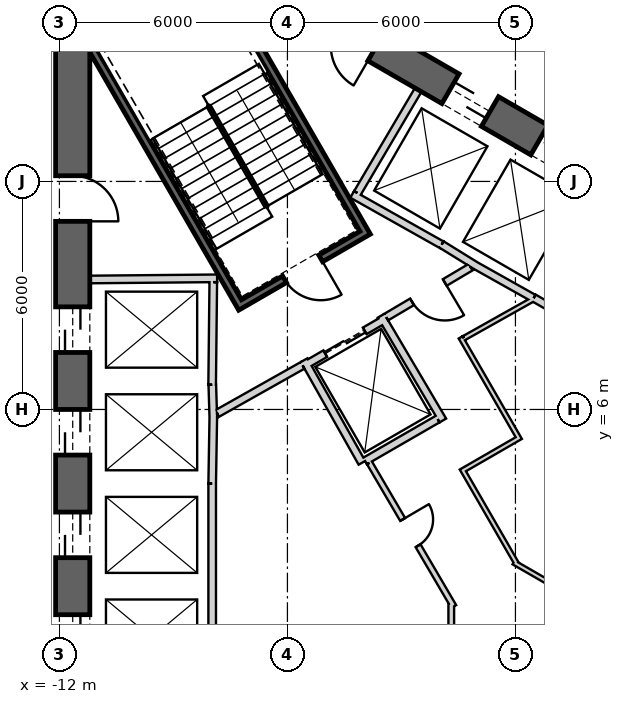
"""IFC4 building model, lengths in metres.
Left out: names, types, materials, properties, quantities, classifications, styles, units other than length and angle.
Written with IfcOpenShell. Run it as: python <this file> out.ifc"""

import sys

from ifc_helpers import new_model, si_unit, direction, frame, frame_2d, origin, place, context, subcontext, project, spatial, rectangle, extrude, element, fill, save


model = new_model("IFC4")
c1 = context("Model", 3, precision=1e-05, world=origin(), true_north=direction((0.0, 1.0)))
c2 = subcontext(c1, "Body", "Model", "MODEL_VIEW")
j1 = project(units=[si_unit("LENGTHUNIT", "METRE"), si_unit("PLANEANGLEUNIT", "RADIAN")], contexts=[c1])
p1 = place(None, origin())
s1 = spatial("IfcSite", under=j1, at=p1, CompositionType="ELEMENT")
p2 = place(p1, origin())
s2 = spatial("IfcBuilding", under=s1, at=p2, CompositionType="ELEMENT")
p3 = place(p2, frame((0.0, 0.0, 131.6)))
s3 = spatial("IfcBuildingStorey", under=s2, at=p3, CompositionType="ELEMENT", Elevation=131.6)
p4 = place(p3, frame((19.475, 2.208, 0.0), z_axis=(0.0, 0.0, 1.0), x_axis=(-0.866028369851, 0.499994862586, 0.0)))
e1 = element("IfcWall", 1, at=p4, inside=s3, PredefinedType="SHEAR", context=c2, shape_type="SweptSolid", body=[
    extrude(rectangle(XDim=31.523, YDim=0.9, at=frame_2d((15.762, 0.0))), origin(), (0.0, 0.0, 1.0), 4.1),
])
p5 = place(p4, frame((7.062, 0.0, 0.0)))
e2 = element("IfcOpeningElement", 2, at=p5, cuts=e1, PredefinedType="OPENING", context=c2, shape_type="SweptSolid", body=[
    extrude(rectangle(XDim=1.2, YDim=2.4, at=frame_2d((0.6, 1.2))), frame((0.0, 0.46, 0.0), z_axis=(0.0, -1.0, 0.0), x_axis=(1.0, 0.0, 0.0)), (0.0, 0.0, 1.0), 0.92),
])
p6 = place(p4, frame((9.762, 0.0, 0.0)))
e3 = element("IfcOpeningElement", 3, at=p6, cuts=e1, PredefinedType="OPENING", context=c2, shape_type="SweptSolid", body=[
    extrude(rectangle(XDim=1.2, YDim=2.4, at=frame_2d((0.6, 1.2))), frame((0.0, 0.46, 0.0), z_axis=(0.0, -1.0, 0.0), x_axis=(1.0, 0.0, 0.0)), (0.0, 0.0, 1.0), 0.92),
])
p7 = place(p4, frame((12.462, 0.0, 0.0)))
e4 = element("IfcOpeningElement", 4, at=p7, cuts=e1, PredefinedType="OPENING", context=c2, shape_type="SweptSolid", body=[
    extrude(rectangle(XDim=1.2, YDim=2.4, at=frame_2d((0.6, 1.2))), frame((0.0, 0.46, 0.0), z_axis=(0.0, -1.0, 0.0), x_axis=(1.0, 0.0, 0.0)), (0.0, 0.0, 1.0), 0.92),
])
p8 = place(p4, frame((15.162, 0.0, 0.0)))
e5 = element("IfcOpeningElement", 5, at=p8, cuts=e1, PredefinedType="OPENING", context=c2, shape_type="SweptSolid", body=[
    extrude(rectangle(XDim=1.2, YDim=2.4, at=frame_2d((0.6, 1.2))), frame((0.0, 0.46, 0.0), z_axis=(0.0, -1.0, 0.0), x_axis=(1.0, 0.0, 0.0)), (0.0, 0.0, 1.0), 0.92),
])
p9 = place(p4, frame((17.862, 0.0, 0.0)))
e6 = element("IfcOpeningElement", 6, at=p9, cuts=e1, PredefinedType="OPENING", context=c2, shape_type="SweptSolid", body=[
    extrude(rectangle(XDim=1.2, YDim=2.4, at=frame_2d((0.6, 1.2))), frame((0.0, 0.46, 0.0), z_axis=(0.0, -1.0, 0.0), x_axis=(1.0, 0.0, 0.0)), (0.0, 0.0, 1.0), 0.92),
])
p10 = place(p4, frame((20.562, 0.0, 0.0)))
e7 = element("IfcOpeningElement", 7, at=p10, cuts=e1, PredefinedType="OPENING", context=c2, shape_type="SweptSolid", body=[
    extrude(rectangle(XDim=1.2, YDim=2.4, at=frame_2d((0.6, 1.2))), frame((0.0, 0.46, 0.0), z_axis=(0.0, -1.0, 0.0), x_axis=(1.0, 0.0, 0.0)), (0.0, 0.0, 1.0), 0.92),
])
p11 = place(p4, frame((23.262, 0.0, 0.0)))
e8 = element("IfcOpeningElement", 8, at=p11, cuts=e1, PredefinedType="OPENING", context=c2, shape_type="SweptSolid", body=[
    extrude(rectangle(XDim=1.2, YDim=2.4, at=frame_2d((0.6, 1.2))), frame((0.0, 0.46, 0.0), z_axis=(0.0, -1.0, 0.0), x_axis=(1.0, 0.0, 0.0)), (0.0, 0.0, 1.0), 0.92),
])
p12 = place(p4, frame((3.612, 0.0, 0.0)))
e9 = element("IfcOpeningElement", 9, at=p12, cuts=e1, PredefinedType="OPENING", context=c2, shape_type="SweptSolid", body=[
    extrude(rectangle(XDim=1.2, YDim=2.4, at=frame_2d((0.6, 1.2))), frame((0.0, 0.46, 0.0), z_axis=(0.0, -1.0, 0.0), x_axis=(1.0, 0.0, 0.0)), (0.0, 0.0, 1.0), 0.92),
])
p13 = place(p4, frame((26.712, 0.0, 0.0)))
e10 = element("IfcOpeningElement", 10, at=p13, cuts=e1, PredefinedType="OPENING", context=c2, shape_type="SweptSolid", body=[
    extrude(rectangle(XDim=1.2, YDim=2.4, at=frame_2d((0.6, 1.2))), frame((0.0, 0.46, 0.0), z_axis=(0.0, -1.0, 0.0), x_axis=(1.0, 0.0, 0.0)), (0.0, 0.0, 1.0), 0.92),
])
p14 = place(p3, frame((-11.65, 15.762, 0.0), z_axis=(0.0, 0.0, 1.0), x_axis=(0.0, -1.0, 0.0)))
e11 = element("IfcWall", 11, at=p14, inside=s3, PredefinedType="SHEAR", context=c2, shape_type="SweptSolid", body=[
    extrude(rectangle(XDim=31.523, YDim=0.9, at=frame_2d((15.762, 0.0))), origin(), (0.0, 0.0, 1.0), 4.1),
])
p15 = place(p14, frame((7.062, 0.0, 0.0)))
e12 = element("IfcOpeningElement", 12, at=p15, cuts=e11, PredefinedType="OPENING", context=c2, shape_type="SweptSolid", body=[
    extrude(rectangle(XDim=1.2, YDim=2.4, at=frame_2d((0.6, 1.2))), frame((0.0, 0.46, 0.0), z_axis=(0.0, -1.0, 0.0), x_axis=(1.0, 0.0, 0.0)), (0.0, 0.0, 1.0), 0.92),
])
p16 = place(p14, frame((9.762, 0.0, 0.0)))
e13 = element("IfcOpeningElement", 13, at=p16, cuts=e11, PredefinedType="OPENING", context=c2, shape_type="SweptSolid", body=[
    extrude(rectangle(XDim=1.2, YDim=2.4, at=frame_2d((0.6, 1.2))), frame((0.0, 0.46, 0.0), z_axis=(0.0, -1.0, 0.0), x_axis=(1.0, 0.0, 0.0)), (0.0, 0.0, 1.0), 0.92),
])
p17 = place(p14, frame((12.462, 0.0, 0.0)))
e14 = element("IfcOpeningElement", 14, at=p17, cuts=e11, PredefinedType="OPENING", context=c2, shape_type="SweptSolid", body=[
    extrude(rectangle(XDim=1.2, YDim=2.4, at=frame_2d((0.6, 1.2))), frame((0.0, 0.46, 0.0), z_axis=(0.0, -1.0, 0.0), x_axis=(1.0, 0.0, 0.0)), (0.0, 0.0, 1.0), 0.92),
])
p18 = place(p14, frame((15.162, 0.0, 0.0)))
e15 = element("IfcOpeningElement", 15, at=p18, cuts=e11, PredefinedType="OPENING", context=c2, shape_type="SweptSolid", body=[
    extrude(rectangle(XDim=1.2, YDim=2.4, at=frame_2d((0.6, 1.2))), frame((0.0, 0.46, 0.0), z_axis=(0.0, -1.0, 0.0), x_axis=(1.0, 0.0, 0.0)), (0.0, 0.0, 1.0), 0.92),
])
p19 = place(p14, frame((17.862, 0.0, 0.0)))
e16 = element("IfcOpeningElement", 16, at=p19, cuts=e11, PredefinedType="OPENING", context=c2, shape_type="SweptSolid", body=[
    extrude(rectangle(XDim=1.2, YDim=2.4, at=frame_2d((0.6, 1.2))), frame((0.0, 0.46, 0.0), z_axis=(0.0, -1.0, 0.0), x_axis=(1.0, 0.0, 0.0)), (0.0, 0.0, 1.0), 0.92),
])
p20 = place(p14, frame((20.562, 0.0, 0.0)))
e17 = element("IfcOpeningElement", 17, at=p20, cuts=e11, PredefinedType="OPENING", context=c2, shape_type="SweptSolid", body=[
    extrude(rectangle(XDim=1.2, YDim=2.4, at=frame_2d((0.6, 1.2))), frame((0.0, 0.46, 0.0), z_axis=(0.0, -1.0, 0.0), x_axis=(1.0, 0.0, 0.0)), (0.0, 0.0, 1.0), 0.92),
])
p21 = place(p14, frame((23.262, 0.0, 0.0)))
e18 = element("IfcOpeningElement", 18, at=p21, cuts=e11, PredefinedType="OPENING", context=c2, shape_type="SweptSolid", body=[
    extrude(rectangle(XDim=1.2, YDim=2.4, at=frame_2d((0.6, 1.2))), frame((0.0, 0.46, 0.0), z_axis=(0.0, -1.0, 0.0), x_axis=(1.0, 0.0, 0.0)), (0.0, 0.0, 1.0), 0.92),
])
p22 = place(p14, frame((3.612, 0.0, 0.0)))
e19 = element("IfcOpeningElement", 19, at=p22, cuts=e11, PredefinedType="OPENING", context=c2, shape_type="SweptSolid", body=[
    extrude(rectangle(XDim=1.2, YDim=2.4, at=frame_2d((0.6, 1.2))), frame((0.0, 0.46, 0.0), z_axis=(0.0, -1.0, 0.0), x_axis=(1.0, 0.0, 0.0)), (0.0, 0.0, 1.0), 0.92),
])
p23 = place(p14, frame((26.712, 0.0, 0.0)))
e20 = element("IfcOpeningElement", 20, at=p23, cuts=e11, PredefinedType="OPENING", context=c2, shape_type="SweptSolid", body=[
    extrude(rectangle(XDim=1.2, YDim=2.4, at=frame_2d((0.6, 1.2))), frame((0.0, 0.46, 0.0), z_axis=(0.0, -1.0, 0.0), x_axis=(1.0, 0.0, 0.0)), (0.0, 0.0, 1.0), 0.92),
])
p24 = place(p3, frame((-11.2, 9.42, 0.0), z_axis=(0.0, 0.0, 1.0), x_axis=(0.999957167047, 0.009255488683, 0.0)))
e21 = element("IfcWall", 21, at=p24, inside=s3, PredefinedType="PLUMBINGWALL", context=c2, shape_type="SweptSolid", body=[
    extrude(rectangle(XDim=3.35, YDim=0.2, at=frame_2d((1.675, 0.0))), origin(), (0.0, 0.0, 1.0), 3.8),
])
p25 = place(p3, frame((-7.951, 9.35, 0.0), z_axis=(0.0, 0.0, 1.0), x_axis=(-0.011120469654, -0.999938165666, 0.0)))
e22 = element("IfcWall", 22, at=p25, inside=s3, PredefinedType="PLUMBINGWALL", context=c2, shape_type="SweptSolid", body=[
    extrude(rectangle(XDim=2.7, YDim=0.2, at=frame_2d((1.35, 0.0))), origin(), (0.0, 0.0, 1.0), 3.8),
])
p26 = place(p3, frame((7.497, 4.886, 0.0), z_axis=(0.0, 0.0, 1.0), x_axis=(-0.866030989016, 0.499990325971, 0.0)))
e23 = element("IfcWall", 23, at=p26, inside=s3, PredefinedType="PLUMBINGWALL", context=c2, shape_type="SweptSolid", body=[
    extrude(rectangle(XDim=8.1, YDim=0.2, at=frame_2d((4.05, 0.0))), origin(), (0.0, 0.0, 1.0), 3.8),
])
p27 = place(p3, frame((-7.977, 6.65, 0.0), z_axis=(0.0, 0.0, 1.0), x_axis=(0.030861509705, -0.999523670164, 0.0)))
e24 = element("IfcWall", 24, at=p27, inside=s3, PredefinedType="PLUMBINGWALL", context=c2, shape_type="SweptSolid", body=[
    extrude(rectangle(XDim=0.878, YDim=0.2, at=frame_2d((0.439, 0.0))), origin(), (0.0, 0.0, 1.0), 3.8),
])
p28 = place(p3, frame((-7.949, 5.894, 0.0), z_axis=(0.0, 0.0, 1.0), x_axis=(-0.016809909365, -0.999858703491, 0.0)))
e25 = element("IfcWall", 25, at=p28, inside=s3, PredefinedType="PLUMBINGWALL", context=c2, shape_type="SweptSolid", body=[
    extrude(rectangle(XDim=1.844, YDim=0.2, at=frame_2d((0.922, 0.0))), origin(), (0.0, 0.0, 1.0), 3.8),
])
p29 = place(p3, frame((-7.98, 4.05, 0.0), z_axis=(0.0, 0.0, 1.0), x_axis=(0.0, -1.0, 0.0)))
e26 = element("IfcWall", 26, at=p29, inside=s3, PredefinedType="PLUMBINGWALL", context=c2, shape_type="SweptSolid", body=[
    extrude(rectangle(XDim=8.1, YDim=0.2, at=frame_2d((4.05, 0.0))), origin(), (0.0, 0.0, 1.0), 3.8),
])
p30 = place(p3, frame((-1.941, 10.339, 0.0), z_axis=(0.0, 0.0, 1.0), x_axis=(0.850216889117, -0.526432561171, 0.0)))
e27 = element("IfcWall", 27, at=p30, inside=s3, PredefinedType="PLUMBINGWALL", context=c2, shape_type="SweptSolid", body=[
    extrude(rectangle(XDim=1.078, YDim=0.2, at=frame_2d((0.539, 0.0))), origin(), (0.0, 0.0, 1.0), 3.8),
])
p31 = place(p3, frame((0.478, 8.928, 0.0), z_axis=(0.0, 0.0, 1.0), x_axis=(-0.871988740738, 0.489525929882, 0.0)))
e28 = element("IfcWall", 28, at=p31, inside=s3, PredefinedType="PLUMBINGWALL", context=c2, shape_type="SweptSolid", body=[
    extrude(rectangle(XDim=1.845, YDim=0.2, at=frame_2d((0.922, 0.0))), origin(), (0.0, 0.0, 1.0), 3.8),
])
p32 = place(p3, frame((-4.296, 11.659, 0.0), z_axis=(0.0, 0.0, 1.0), x_axis=(0.871534483978, -0.490334215854, 0.0)))
e29 = element("IfcWall", 29, at=p32, inside=s3, PredefinedType="PLUMBINGWALL", context=c2, shape_type="SweptSolid", body=[
    extrude(rectangle(XDim=2.7, YDim=0.2, at=frame_2d((1.35, 0.0))), origin(), (0.0, 0.0, 1.0), 3.8),
])
p33 = place(p3, frame((-4.158, 11.696, 0.0), z_axis=(0.0, 0.0, 1.0), x_axis=(0.508018930956, 0.861345903683, 0.0)))
e30 = element("IfcWall", 30, at=p33, inside=s3, PredefinedType="PLUMBINGWALL", context=c2, shape_type="SweptSolid", body=[
    extrude(rectangle(XDim=3.15, YDim=0.2, at=frame_2d((1.575, 0.0))), origin(), (0.0, 0.0, 1.0), 3.8),
])
p34 = place(p3, frame((-11.245, 15.678, -0.3), z_axis=(0.0, 0.0, 1.0), x_axis=(0.499977274689, -0.866038523851, 0.0)))
e31 = element("IfcWall", 31, at=p34, inside=s3, PredefinedType="SHEAR", context=c2, shape_type="SweptSolid", body=[
    extrude(rectangle(XDim=8.1, YDim=0.2, at=frame_2d((4.05, 0.0))), origin(), (0.0, 0.0, 1.0), 4.1),
])
p35 = place(p3, frame((-7.854, 17.405, -0.3), z_axis=(0.0, 0.0, 1.0), x_axis=(0.499997992926, -0.866026562566, 0.0)))
e32 = element("IfcWall", 32, at=p35, inside=s3, PredefinedType="SHEAR", context=c2, shape_type="SweptSolid", body=[
    extrude(rectangle(XDim=7.9, YDim=0.2, at=frame_2d((3.95, 0.0))), origin(), (0.0, 0.0, 1.0), 4.1),
])
p36 = place(p3, frame((-7.159, 8.8, -0.3), z_axis=(0.0, 0.0, 1.0), x_axis=(0.866047807691, 0.499961193289, 0.0)))
e33 = element("IfcWall", 33, at=p36, inside=s3, PredefinedType="SHEAR", context=c2, shape_type="SweptSolid", body=[
    extrude(rectangle(XDim=3.6, YDim=0.2, at=frame_2d((1.8, 0.0))), origin(), (0.0, 0.0, 1.0), 4.1),
])
p37 = place(p36, frame((1.25, 0.0, 0.3)))
e34 = element("IfcOpeningElement", 34, at=p37, cuts=e33, PredefinedType="OPENING", context=c2, shape_type="SweptSolid", body=[
    extrude(rectangle(XDim=1.1, YDim=2.1, at=frame_2d((0.55, 1.05))), frame((0.0, 0.11, 0.0), z_axis=(0.0, -1.0, 0.0), x_axis=(1.0, 0.0, 0.0)), (0.0, 0.0, 1.0), 0.22),
])
p38 = place(p3, frame((-5.524, 7.168, 0.0), z_axis=(0.0, 0.0, 1.0), x_axis=(0.866024647952, 0.500001309137, 0.0)))
e35 = element("IfcWall", 35, at=p38, inside=s3, PredefinedType="PLUMBINGWALL", context=c2, shape_type="SweptSolid", body=[
    extrude(rectangle(XDim=2.4, YDim=0.2, at=frame_2d((1.2, 0.0))), origin(), (0.0, 0.0, 1.0), 3.8),
])
p39 = place(p38, frame((0.6, 0.0, 0.0)))
e36 = element("IfcOpeningElement", 36, at=p39, cuts=e35, PredefinedType="OPENING", context=c2, shape_type="SweptSolid", body=[
    extrude(rectangle(XDim=1.2, YDim=2.4, at=frame_2d((0.6, 1.2))), frame((0.0, 0.11, 0.0), z_axis=(0.0, -1.0, 0.0), x_axis=(1.0, 0.0, 0.0)), (0.0, 0.0, 1.0), 0.22),
])
p40 = place(p3, frame((-4.039, 4.596, 0.0), z_axis=(0.0, 0.0, 1.0), x_axis=(-0.491322718731, 0.870977603649, 0.0)))
e37 = element("IfcWall", 37, at=p40, inside=s3, PredefinedType="PLUMBINGWALL", context=c2, shape_type="SweptSolid", body=[
    extrude(rectangle(XDim=3.1, YDim=0.2, at=frame_2d((1.55, 0.0))), origin(), (0.0, 0.0, 1.0), 3.8),
])
p41 = place(p3, frame((-3.538, 8.465, 0.0), z_axis=(0.0, 0.0, 1.0), x_axis=(0.508616218331, -0.860993346345, 0.0)))
e38 = element("IfcWall", 38, at=p41, inside=s3, PredefinedType="PLUMBINGWALL", context=c2, shape_type="SweptSolid", body=[
    extrude(rectangle(XDim=3.2, YDim=0.2, at=frame_2d((1.6, 0.0))), origin(), (0.0, 0.0, 1.0), 3.8),
])
p42 = place(p3, frame((-2.047, 5.746, 0.0), z_axis=(0.0, 0.0, 1.0), x_axis=(-0.866019606374, -0.500010041276, 0.0)))
e39 = element("IfcWall", 39, at=p42, inside=s3, PredefinedType="PLUMBINGWALL", context=c2, shape_type="SweptSolid", body=[
    extrude(rectangle(XDim=2.205, YDim=0.2, at=frame_2d((1.102, 0.0))), origin(), (0.0, 0.0, 1.0), 3.8),
])
p43 = place(p3, frame((-5.6, 7.16, 0.0), z_axis=(0.0, 0.0, 1.0), x_axis=(-0.871340486379, -0.490678873396, 0.0)))
e40 = element("IfcWall", 40, at=p43, inside=s3, PredefinedType="PARTITIONING", context=c2, shape_type="SweptSolid", body=[
    extrude(rectangle(XDim=2.581, YDim=0.2, at=frame_2d((1.291, 0.0))), origin(), (0.0, 0.0, 1.0), 3.8),
])
p44 = place(p3, frame((-1.179, 9.745, 0.0), z_axis=(0.0, 0.0, 1.0), x_axis=(-0.860598681535, -0.509283721849, 0.0)))
e41 = element("IfcWall", 41, at=p44, inside=s3, PredefinedType="PARTITIONING", context=c2, shape_type="SweptSolid", body=[
    extrude(rectangle(XDim=2.581, YDim=0.2, at=frame_2d((1.291, 0.0))), origin(), (0.0, 0.0, 1.0), 3.8),
])
p45 = place(p44, frame((0.791, 0.0, 0.0)))
e42 = element("IfcOpeningElement", 42, at=p45, cuts=e41, PredefinedType="OPENING", context=c2, shape_type="SweptSolid", body=[
    extrude(rectangle(XDim=1.0, YDim=2.1, at=frame_2d((0.5, 1.05))), frame((0.0, 0.11, 0.0), z_axis=(0.0, -1.0, 0.0), x_axis=(1.0, 0.0, 0.0)), (0.0, 0.0, 1.0), 0.22),
])
p46 = place(p3, frame((-1.624, 0.815, 0.0), z_axis=(0.0, 0.0, 1.0), x_axis=(-0.505868173579, 0.862610799237, 0.0)))
e43 = element("IfcWall", 43, at=p46, inside=s3, PredefinedType="PLUMBINGWALL", context=c2, shape_type="SweptSolid", body=[
    extrude(rectangle(XDim=4.383, YDim=0.15, at=frame_2d((2.191, 0.0))), origin(), (0.0, 0.0, 1.0), 3.8),
])
p47 = place(p46, frame((1.855, 0.0, 0.0)))
e44 = element("IfcOpeningElement", 44, at=p47, cuts=e43, PredefinedType="OPENING", context=c2, shape_type="SweptSolid", body=[
    extrude(rectangle(XDim=0.8, YDim=2.1, at=frame_2d((0.4, 1.05))), frame((0.0, 0.085, 0.0), z_axis=(0.0, -1.0, 0.0), x_axis=(1.0, 0.0, 0.0)), (0.0, 0.0, 1.0), 0.17),
])
p48 = place(p3, frame((-1.689, -1.053, 0.0), z_axis=(0.0, 0.0, 1.0), x_axis=(0.0, 1.0, 0.0)))
e45 = element("IfcWall", 45, at=p48, inside=s3, PredefinedType="PLUMBINGWALL", context=c2, shape_type="SweptSolid", body=[
    extrude(rectangle(XDim=1.954, YDim=0.15, at=frame_2d((0.977, 0.0))), origin(), (0.0, 0.0, 1.0), 3.8),
])
p49 = place(p3, frame((-0.047, 1.977, 0.0), z_axis=(0.0, 0.0, 1.0), x_axis=(0.865998615205, -0.500046396311, 0.0)))
e46 = element("IfcWall", 46, at=p49, inside=s3, PredefinedType="PARTITIONING", context=c2, shape_type="SweptSolid", body=[
    extrude(rectangle(XDim=1.935, YDim=0.12, at=frame_2d((0.968, 0.0))), origin(), (0.0, 0.0, 1.0), 3.8),
])
p50 = place(p3, frame((-1.414, 4.449, 0.0), z_axis=(0.0, 0.0, 1.0), x_axis=(0.500028961621, -0.866008682139, 0.0)))
e47 = element("IfcWall", 47, at=p50, inside=s3, PredefinedType="PARTITIONING", context=c2, shape_type="SweptSolid", body=[
    extrude(rectangle(XDim=2.896, YDim=0.12, at=frame_2d((1.448, 0.0))), origin(), (0.0, 0.0, 1.0), 3.8),
])
p51 = place(p3, frame((0.14, 5.277, 0.0), z_axis=(0.0, 0.0, 1.0), x_axis=(-0.865989465428, -0.500062241894, 0.0)))
e48 = element("IfcWall", 48, at=p51, inside=s3, PredefinedType="PARTITIONING", context=c2, shape_type="SweptSolid", body=[
    extrude(rectangle(XDim=1.7, YDim=0.12, at=frame_2d((0.85, 0.0))), origin(), (0.0, 0.0, 1.0), 3.8),
])
p52 = place(p3, frame((-1.442, 7.897, 0.0), z_axis=(0.0, 0.0, 1.0), x_axis=(0.499990139034, -0.866031096941, 0.0)))
e49 = element("IfcWall", 49, at=p52, inside=s3, PredefinedType="PARTITIONING", context=c2, shape_type="SweptSolid", body=[
    extrude(rectangle(XDim=3.0, YDim=0.12, at=frame_2d((1.5, 0.0))), origin(), (0.0, 0.0, 1.0), 3.8),
])
p53 = place(p3, frame((0.475, 8.905, 0.0), z_axis=(0.0, 0.0, 1.0), x_axis=(-0.871832572129, -0.489804007921, 0.0)))
e50 = element("IfcWall", 50, at=p53, inside=s3, PredefinedType="PARTITIONING", context=c2, shape_type="SweptSolid", body=[
    extrude(rectangle(XDim=2.104, YDim=0.12, at=frame_2d((1.052, 0.0))), origin(), (0.0, 0.0, 1.0), 3.8),
])
p54 = place(p3, frame((22.336, 5.464, 0.0), z_axis=(0.0, 0.0, 1.0), x_axis=(-0.866027503332, 0.499996363459, 0.0)))
e51 = element("IfcWall", 51, at=p54, inside=s3, PredefinedType="PARTITIONING", context=c2, shape_type="SweptSolid", body=[
    extrude(rectangle(XDim=33.022, YDim=0.2, at=frame_2d((16.511, 0.0))), origin(), (0.0, 0.0, 1.0), 2.98),
])
p55 = place(p54, frame((16.061, 0.0, 0.0)))
e52 = element("IfcOpeningElement", 52, at=p55, cuts=e51, PredefinedType="OPENING", context=c2, shape_type="SweptSolid", body=[
    extrude(rectangle(XDim=1.0, YDim=2.1, at=frame_2d((0.5, 1.05))), frame((0.0, 0.11, 0.0), z_axis=(0.0, -1.0, 0.0), x_axis=(1.0, 0.0, 0.0)), (0.0, 0.0, 1.0), 0.22),
])
p56 = place(p37, origin())
e53 = element("IfcDoor", 53, at=p56, inside=s3, OperationType="SINGLE_SWING_LEFT", PredefinedType="USERDEFINED", context=c2, shape_type="SweptSolid", body=[
    extrude(rectangle(XDim=1.1, YDim=2.1, at=frame_2d((0.55, 1.05))), frame((0.0, 0.025, 0.0), z_axis=(0.0, -1.0, 0.0), x_axis=(1.0, 0.0, 0.0)), (0.0, 0.0, 1.0), 0.05),
])
fill(e34, e53)
p57 = place(p45, origin())
e54 = element("IfcDoor", 54, at=p57, inside=s3, OperationType="SINGLE_SWING_RIGHT", PredefinedType="USERDEFINED", context=c2, shape_type="SweptSolid", body=[
    extrude(rectangle(XDim=1.0, YDim=2.1, at=frame_2d((0.5, 1.05))), frame((0.0, 0.025, 0.0), z_axis=(0.0, -1.0, 0.0), x_axis=(1.0, 0.0, 0.0)), (0.0, 0.0, 1.0), 0.05),
])
fill(e42, e54)
p58 = place(p39, origin())
e55 = element("IfcDoor", 55, at=p58, inside=s3, OperationType="SLIDING_TO_LEFT", PredefinedType="USERDEFINED", context=c2, shape_type="SweptSolid", body=[
    extrude(rectangle(XDim=1.2, YDim=2.4, at=frame_2d((0.6, 1.2))), frame((0.0, 0.025, 0.0), z_axis=(0.0, -1.0, 0.0), x_axis=(1.0, 0.0, 0.0)), (0.0, 0.0, 1.0), 0.05),
])
fill(e36, e55)
p59 = place(p47, origin())
e56 = element("IfcDoor", 56, at=p59, inside=s3, OperationType="SINGLE_SWING_LEFT", PredefinedType="USERDEFINED", context=c2, shape_type="SweptSolid", body=[
    extrude(rectangle(XDim=0.8, YDim=2.1, at=frame_2d((0.4, 1.05))), frame((0.0, 0.025, 0.0), z_axis=(0.0, -1.0, 0.0), x_axis=(1.0, 0.0, 0.0)), (0.0, 0.0, 1.0), 0.05),
])
fill(e44, e56)
p60 = place(p15, origin())
e57 = element("IfcDoor", 57, at=p60, inside=s3, OperationType="SLIDING_TO_LEFT", PredefinedType="USERDEFINED", context=c2, shape_type="SweptSolid", body=[
    extrude(rectangle(XDim=1.2, YDim=2.4, at=frame_2d((0.6, 1.2))), frame((0.0, 0.025, 0.0), z_axis=(0.0, -1.0, 0.0), x_axis=(1.0, 0.0, 0.0)), (0.0, 0.0, 1.0), 0.05),
])
fill(e12, e57)
p61 = place(p16, origin())
e58 = element("IfcDoor", 58, at=p61, inside=s3, OperationType="SLIDING_TO_LEFT", PredefinedType="USERDEFINED", context=c2, shape_type="SweptSolid", body=[
    extrude(rectangle(XDim=1.2, YDim=2.4, at=frame_2d((0.6, 1.2))), frame((0.0, 0.025, 0.0), z_axis=(0.0, -1.0, 0.0), x_axis=(1.0, 0.0, 0.0)), (0.0, 0.0, 1.0), 0.05),
])
fill(e13, e58)
p62 = place(p17, origin())
e59 = element("IfcDoor", 59, at=p62, inside=s3, OperationType="SLIDING_TO_LEFT", PredefinedType="USERDEFINED", context=c2, shape_type="SweptSolid", body=[
    extrude(rectangle(XDim=1.2, YDim=2.4, at=frame_2d((0.6, 1.2))), frame((0.0, 0.025, 0.0), z_axis=(0.0, -1.0, 0.0), x_axis=(1.0, 0.0, 0.0)), (0.0, 0.0, 1.0), 0.05),
])
fill(e14, e59)
p63 = place(p18, origin())
e60 = element("IfcDoor", 60, at=p63, inside=s3, OperationType="SLIDING_TO_LEFT", PredefinedType="USERDEFINED", context=c2, shape_type="SweptSolid", body=[
    extrude(rectangle(XDim=1.2, YDim=2.4, at=frame_2d((0.6, 1.2))), frame((0.0, 0.025, 0.0), z_axis=(0.0, -1.0, 0.0), x_axis=(1.0, 0.0, 0.0)), (0.0, 0.0, 1.0), 0.05),
])
fill(e15, e60)
p64 = place(p10, origin())
e61 = element("IfcDoor", 61, at=p64, inside=s3, OperationType="SLIDING_TO_LEFT", PredefinedType="USERDEFINED", context=c2, shape_type="SweptSolid", body=[
    extrude(rectangle(XDim=1.2, YDim=2.4, at=frame_2d((0.6, 1.2))), frame((0.0, 0.025, 0.0), z_axis=(0.0, -1.0, 0.0), x_axis=(1.0, 0.0, 0.0)), (0.0, 0.0, 1.0), 0.05),
])
fill(e7, e61)
p65 = place(p11, origin())
e62 = element("IfcDoor", 62, at=p65, inside=s3, OperationType="SLIDING_TO_LEFT", PredefinedType="USERDEFINED", context=c2, shape_type="SweptSolid", body=[
    extrude(rectangle(XDim=1.2, YDim=2.4, at=frame_2d((0.6, 1.2))), frame((0.0, 0.025, 0.0), z_axis=(0.0, -1.0, 0.0), x_axis=(1.0, 0.0, 0.0)), (0.0, 0.0, 1.0), 0.05),
])
fill(e8, e62)
p66 = place(p22, origin())
e63 = element("IfcDoor", 63, at=p66, inside=s3, OperationType="SINGLE_SWING_LEFT", PredefinedType="USERDEFINED", context=c2, shape_type="SweptSolid", body=[
    extrude(rectangle(XDim=1.2, YDim=2.4, at=frame_2d((0.6, 1.2))), frame((0.0, 0.025, 0.0), z_axis=(0.0, -1.0, 0.0), x_axis=(1.0, 0.0, 0.0)), (0.0, 0.0, 1.0), 0.05),
])
fill(e19, e63)
save(model, sys.argv[1])
